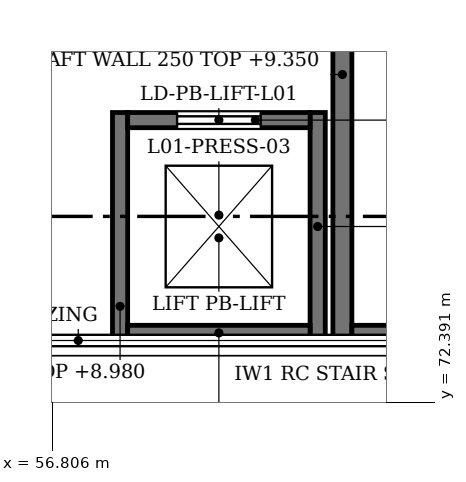
"""IFC4 building model, lengths in metres.
Left out: names, types, materials, properties, quantities, classifications, styles, units other than length and angle.
Written with IfcOpenShell. Run it as: python <this file> out.ifc"""

import sys

from ifc_helpers import new_model, si_unit, direction, frame, frame_2d, origin, place, context, subcontext, project, spatial, rectangle, extrude, element, fill, save


model = new_model("IFC4")
c1 = context("Model", 3, precision=1e-05, world=origin(), true_north=direction((0.0, 1.0)))
c2 = subcontext(c1, "Body", "Model", "MODEL_VIEW")
j1 = project(units=[si_unit("LENGTHUNIT", "METRE"), si_unit("PLANEANGLEUNIT", "RADIAN")], contexts=[c1])
p1 = place(None, origin())
s1 = spatial("IfcSite", under=j1, at=p1, CompositionType="ELEMENT")
p2 = place(p1, origin())
s2 = spatial("IfcBuilding", under=s1, at=p2, CompositionType="ELEMENT")
p3 = place(p2, frame((0.0, 0.0, 4.8)))
s3 = spatial("IfcBuildingStorey", under=s2, at=p3, CompositionType="ELEMENT", Elevation=4.8)
p4 = place(p3, frame((60.625, 73.15, 0.0), z_axis=(0.0, 0.0, 1.0), x_axis=(0.0, 1.0, 0.0)))
e1 = element("IfcWall", 1, at=p4, inside=s3, PredefinedType="SOLIDWALL", context=c2, shape_type="SweptSolid", body=[
    extrude(rectangle(XDim=7.1, YDim=0.25, at=frame_2d((3.55, 0.0))), origin(), (0.0, 0.0, 1.0), 4.55),
])
p5 = place(p3, frame((60.75, 73.275, 0.0), z_axis=(0.0, 0.0, 1.0), x_axis=(1.0, 0.0, 0.0)))
e2 = element("IfcWall", 2, at=p5, inside=s3, PredefinedType="SOLIDWALL", context=c2, shape_type="SweptSolid", body=[
    extrude(rectangle(XDim=2.85, YDim=0.25, at=frame_2d((1.425, 0.0))), origin(), (0.0, 0.0, 1.0), 4.55),
])
for number, where, z_axis, x_axis in (
    (3, (57.7, 73.2, 0.0), (0.0, 0.0, 1.0), (0.0, 1.0, 0.0)),
    (4, (60.3, 73.2, 0.0), (0.0, 0.0, 1.0), (0.0, 1.0, 0.0)),
):
    element("IfcWall", number, at=place(p3, frame(where, z_axis=z_axis, x_axis=x_axis)), inside=s3, PredefinedType="SOLIDWALL", context=c2, shape_type="SweptSolid", body=[
        extrude(rectangle(XDim=3.0, YDim=0.2, at=frame_2d((1.5, 0.0))), origin(), (0.0, 0.0, 1.0), 4.18),
    ])
p6 = place(p3, frame((57.8, 73.3, 0.0), z_axis=(0.0, 0.0, 1.0), x_axis=(1.0, 0.0, 0.0)))
e5 = element("IfcWall", 5, at=p6, inside=s3, PredefinedType="SOLIDWALL", context=c2, shape_type="SweptSolid", body=[
    extrude(rectangle(XDim=2.4, YDim=0.2, at=frame_2d((1.2, 0.0))), origin(), (0.0, 0.0, 1.0), 4.55),
])
p7 = place(p3, frame((57.8, 76.1, 0.0), z_axis=(0.0, 0.0, 1.0), x_axis=(1.0, 0.0, 0.0)))
e6 = element("IfcWall", 6, at=p7, inside=s3, PredefinedType="SOLIDWALL", context=c2, shape_type="SweptSolid", body=[
    extrude(rectangle(XDim=2.4, YDim=0.2, at=frame_2d((1.2, 0.0))), origin(), (0.0, 0.0, 1.0), 4.55),
])
p8 = place(p7, frame((0.65, 0.0, 0.0)))
e7 = element("IfcOpeningElement", 7, at=p8, cuts=e6, PredefinedType="OPENING", context=c2, shape_type="SweptSolid", body=[
    extrude(rectangle(XDim=1.1, YDim=2.1, at=frame_2d((0.55, 1.05))), frame((0.0, 0.11, 0.0), z_axis=(0.0, -1.0, 0.0), x_axis=(1.0, 0.0, 0.0)), (0.0, 0.0, 1.0), 0.22),
])
p9 = place(p8, origin())
e8 = element("IfcDoor", 8, at=p9, inside=s3, OperationType="DOUBLE_DOOR_SLIDING", PredefinedType="DOOR", context=c2, shape_type="SweptSolid", body=[
    extrude(rectangle(XDim=1.1, YDim=2.1, at=frame_2d((0.55, 1.05))), frame((0.0, 0.025, 0.0), z_axis=(0.0, -1.0, 0.0), x_axis=(1.0, 0.0, 0.0)), (0.0, 0.0, 1.0), 0.05),
])
fill(e7, e8)
save(model, sys.argv[1])
